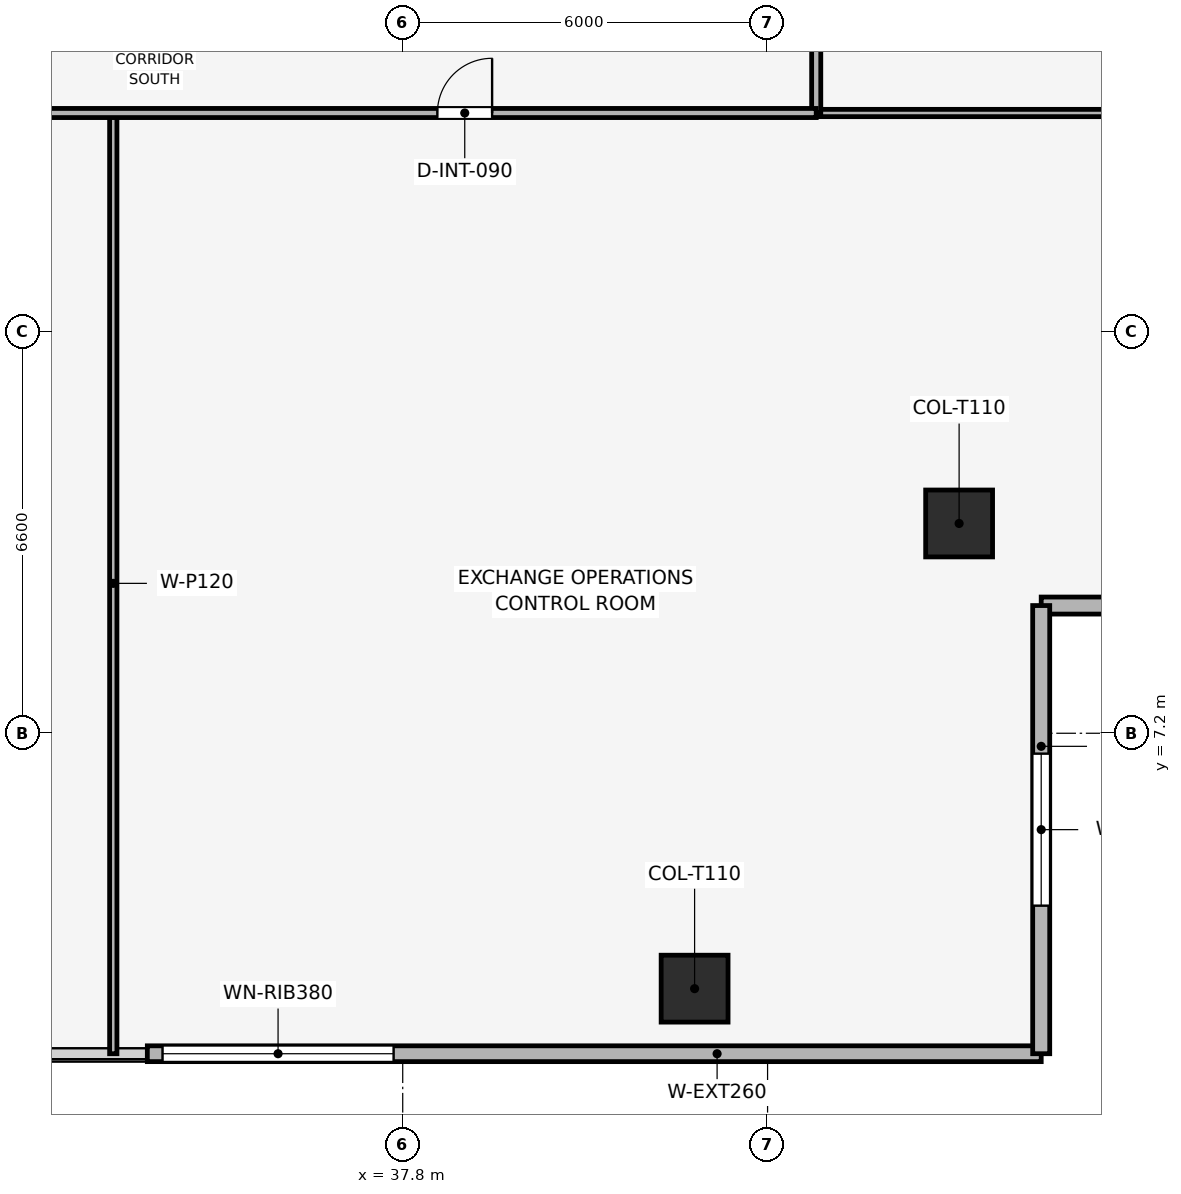
"""IFC4 building model, lengths in metres.
Left out: names, types, materials, properties, quantities, classifications, styles, units other than length and angle.
Written with IfcOpenShell. Run it as: python <this file> out.ifc"""

import sys

from ifc_helpers import new_model, si_unit, direction, frame, frame_2d, origin, origin_2d, place, context, subcontext, project, spatial, rectangle, extrude, element, fill, save


model = new_model("IFC4")
c1 = context("Model", 3, precision=1e-05, world=origin(), true_north=direction((0.0, 1.0)))
c2 = subcontext(c1, "Body", "Model", "MODEL_VIEW")
j1 = project(units=[si_unit("LENGTHUNIT", "METRE"), si_unit("PLANEANGLEUNIT", "RADIAN")], contexts=[c1])
p1 = place(None, origin())
s1 = spatial("IfcSite", under=j1, at=p1, CompositionType="ELEMENT")
p2 = place(p1, origin())
s2 = spatial("IfcBuilding", under=s1, at=p2, CompositionType="ELEMENT")
p3 = place(p2, frame((0.0, 0.0, 218.7)))
s3 = spatial("IfcBuildingStorey", under=s2, at=p3, CompositionType="ELEMENT", Elevation=218.7)
for number, where, z_axis, x_axis in (
    (1, (42.6, 3.0, 0.003), (0.0, 0.0, 1.0), (1.0, 0.0, 0.0)),
    (2, (46.95, 10.65, 0.003), (0.0, 0.0, 1.0), (1.0, 0.0, 0.0)),
):
    element("IfcColumn", number, at=place(p3, frame(where, z_axis=z_axis, x_axis=x_axis)), inside=s3, PredefinedType="COLUMN", context=c2, shape_type="SweptSolid", body=[
        extrude(rectangle(XDim=1.1, YDim=1.1, at=origin_2d()), origin(), (0.0, 0.0, 1.0), 3.494),
    ])
p4 = place(p3, frame((48.3, 1.93, 0.0), z_axis=(0.0, 0.0, 1.0), x_axis=(-1.0, 0.0, 0.0)))
e3 = element("IfcWall", 3, at=p4, inside=s3, PredefinedType="SOLIDWALL", context=c2, shape_type="SweptSolid", body=[
    extrude(rectangle(XDim=14.7, YDim=0.26, at=frame_2d((7.35, 0.0))), origin(), (0.0, 0.0, 1.0), 3.5),
])
p5 = place(p4, frame((10.65, 0.0, 0.9)))
e4 = element("IfcOpeningElement", 4, at=p5, cuts=e3, PredefinedType="OPENING", context=c2, shape_type="SweptSolid", body=[
    extrude(rectangle(XDim=3.8, YDim=1.9, at=frame_2d((1.9, 0.95))), frame((0.0, 0.14, 0.0), z_axis=(0.0, -1.0, 0.0), x_axis=(1.0, 0.0, 0.0)), (0.0, 0.0, 1.0), 0.28),
])
p6 = place(p3, frame((55.67, 9.3, 0.0), z_axis=(0.0, 0.0, 1.0), x_axis=(-1.0, 0.0, 0.0)))
e5 = element("IfcWall", 5, at=p6, inside=s3, PredefinedType="SOLIDWALL", context=c2, shape_type="SweptSolid", body=[
    extrude(rectangle(XDim=7.37, YDim=0.28, at=frame_2d((3.685, 0.0))), origin(), (0.0, 0.0, 1.0), 3.5),
])
p7 = place(p6, frame((2.435, 0.0, 0.9)))
e6 = element("IfcOpeningElement", 6, at=p7, cuts=e5, PredefinedType="OPENING", context=c2, shape_type="SweptSolid", body=[
    extrude(rectangle(XDim=2.5, YDim=1.9, at=frame_2d((1.25, 0.95))), frame((0.0, 0.15, 0.0), z_axis=(0.0, -1.0, 0.0), x_axis=(1.0, 0.0, 0.0)), (0.0, 0.0, 1.0), 0.3),
])
p8 = place(p3, frame((48.3, 9.3, 0.0), z_axis=(0.0, 0.0, 1.0), x_axis=(0.0, -1.0, 0.0)))
e7 = element("IfcWall", 7, at=p8, inside=s3, PredefinedType="SOLIDWALL", context=c2, shape_type="SweptSolid", body=[
    extrude(rectangle(XDim=7.37, YDim=0.28, at=frame_2d((3.685, 0.0))), origin(), (0.0, 0.0, 1.0), 3.5),
])
p9 = place(p8, frame((2.435, 0.0, 0.9)))
e8 = element("IfcOpeningElement", 8, at=p9, cuts=e7, PredefinedType="OPENING", context=c2, shape_type="SweptSolid", body=[
    extrude(rectangle(XDim=2.5, YDim=1.9, at=frame_2d((1.25, 0.95))), frame((0.0, 0.15, 0.0), z_axis=(0.0, -1.0, 0.0), x_axis=(1.0, 0.0, 0.0)), (0.0, 0.0, 1.0), 0.3),
])
p10 = place(p3, frame((33.04, 1.93, 0.0), z_axis=(0.0, 0.0, 1.0), x_axis=(0.0, 1.0, 0.0)))
e9 = element("IfcWall", 9, at=p10, inside=s3, PredefinedType="PARTITIONING", context=c2, shape_type="SweptSolid", body=[
    extrude(rectangle(XDim=15.47, YDim=0.12, at=frame_2d((7.735, 0.0))), origin(), (0.0, 0.0, 1.0), 2.885),
])
p11 = place(p3, frame((44.6, 17.4, 0.0), z_axis=(0.0, 0.0, 1.0), x_axis=(1.0, 0.0, 0.0)))
e10 = element("IfcWall", 10, at=p11, inside=s3, PredefinedType="PARTITIONING", context=c2, shape_type="SweptSolid", body=[
    extrude(rectangle(XDim=11.07, YDim=0.12, at=frame_2d((5.535, 0.0))), origin(), (0.0, 0.0, 1.0), 2.885),
])
p12 = place(p3, frame((44.6, 17.4, 0.0), z_axis=(0.0, 0.0, 1.0), x_axis=(0.0, 1.0, 0.0)))
e11 = element("IfcWall", 11, at=p12, inside=s3, PredefinedType="PARTITIONING", context=c2, shape_type="SweptSolid", body=[
    extrude(rectangle(XDim=2.4, YDim=0.15, at=frame_2d((1.2, 0.0))), origin(), (0.0, 0.0, 1.0), 3.5),
])
p13 = place(p3, frame((13.0, 17.4, 0.0), z_axis=(0.0, 0.0, 1.0), x_axis=(1.0, 0.0, 0.0)))
e12 = element("IfcWall", 12, at=p13, inside=s3, PredefinedType="PARTITIONING", context=c2, shape_type="SweptSolid", body=[
    extrude(rectangle(XDim=31.6, YDim=0.15, at=frame_2d((15.8, 0.0))), origin(), (0.0, 0.0, 1.0), 3.035),
])
p14 = place(p13, frame((0.739, 0.0, 0.0)))
e13 = element("IfcOpeningElement", 13, at=p14, cuts=e12, PredefinedType="OPENING", context=c2, shape_type="SweptSolid", body=[
    extrude(rectangle(XDim=0.9, YDim=2.1, at=frame_2d((0.45, 1.05))), frame((0.0, 0.085, 0.0), z_axis=(0.0, -1.0, 0.0), x_axis=(1.0, 0.0, 0.0)), (0.0, 0.0, 1.0), 0.17),
])
p15 = place(p13, frame((6.344, 0.0, 0.0)))
e14 = element("IfcOpeningElement", 14, at=p15, cuts=e12, PredefinedType="OPENING", context=c2, shape_type="SweptSolid", body=[
    extrude(rectangle(XDim=0.9, YDim=2.1, at=frame_2d((0.45, 1.05))), frame((0.0, 0.085, 0.0), z_axis=(0.0, -1.0, 0.0), x_axis=(1.0, 0.0, 0.0)), (0.0, 0.0, 1.0), 0.17),
])
p16 = place(p13, frame((15.174, 0.0, 0.0)))
e15 = element("IfcOpeningElement", 15, at=p16, cuts=e12, PredefinedType="OPENING", context=c2, shape_type="SweptSolid", body=[
    extrude(rectangle(XDim=0.9, YDim=2.1, at=frame_2d((0.45, 1.05))), frame((0.0, 0.085, 0.0), z_axis=(0.0, -1.0, 0.0), x_axis=(1.0, 0.0, 0.0)), (0.0, 0.0, 1.0), 0.17),
])
p17 = place(p13, frame((25.37, 0.0, 0.0)))
e16 = element("IfcOpeningElement", 16, at=p17, cuts=e12, PredefinedType="OPENING", context=c2, shape_type="SweptSolid", body=[
    extrude(rectangle(XDim=0.9, YDim=2.1, at=frame_2d((0.45, 1.05))), frame((0.0, 0.085, 0.0), z_axis=(0.0, -1.0, 0.0), x_axis=(1.0, 0.0, 0.0)), (0.0, 0.0, 1.0), 0.17),
])
p18 = place(p5, origin())
e17 = element("IfcWindow", 17, at=p18, inside=s3, PartitioningType="SINGLE_PANEL", PredefinedType="WINDOW", context=c2, shape_type="SweptSolid", body=[
    extrude(rectangle(XDim=3.8, YDim=1.9, at=frame_2d((1.9, 0.95))), frame((0.0, 0.03, 0.0), z_axis=(0.0, -1.0, 0.0), x_axis=(1.0, 0.0, 0.0)), (0.0, 0.0, 1.0), 0.06),
])
fill(e4, e17)
p19 = place(p9, origin())
e18 = element("IfcWindow", 18, at=p19, inside=s3, PartitioningType="SINGLE_PANEL", PredefinedType="WINDOW", context=c2, shape_type="SweptSolid", body=[
    extrude(rectangle(XDim=2.5, YDim=1.9, at=frame_2d((1.25, 0.95))), frame((0.0, 0.03, 0.0), z_axis=(0.0, -1.0, 0.0), x_axis=(1.0, 0.0, 0.0)), (0.0, 0.0, 1.0), 0.06),
])
fill(e8, e18)
p20 = place(p17, origin())
e19 = element("IfcDoor", 19, at=p20, inside=s3, OperationType="SINGLE_SWING_RIGHT", PredefinedType="DOOR", context=c2, shape_type="SweptSolid", body=[
    extrude(rectangle(XDim=0.9, YDim=2.1, at=frame_2d((0.45, 1.05))), frame((0.0, 0.025, 0.0), z_axis=(0.0, -1.0, 0.0), x_axis=(1.0, 0.0, 0.0)), (0.0, 0.0, 1.0), 0.05),
])
fill(e16, e19)
save(model, sys.argv[1])
